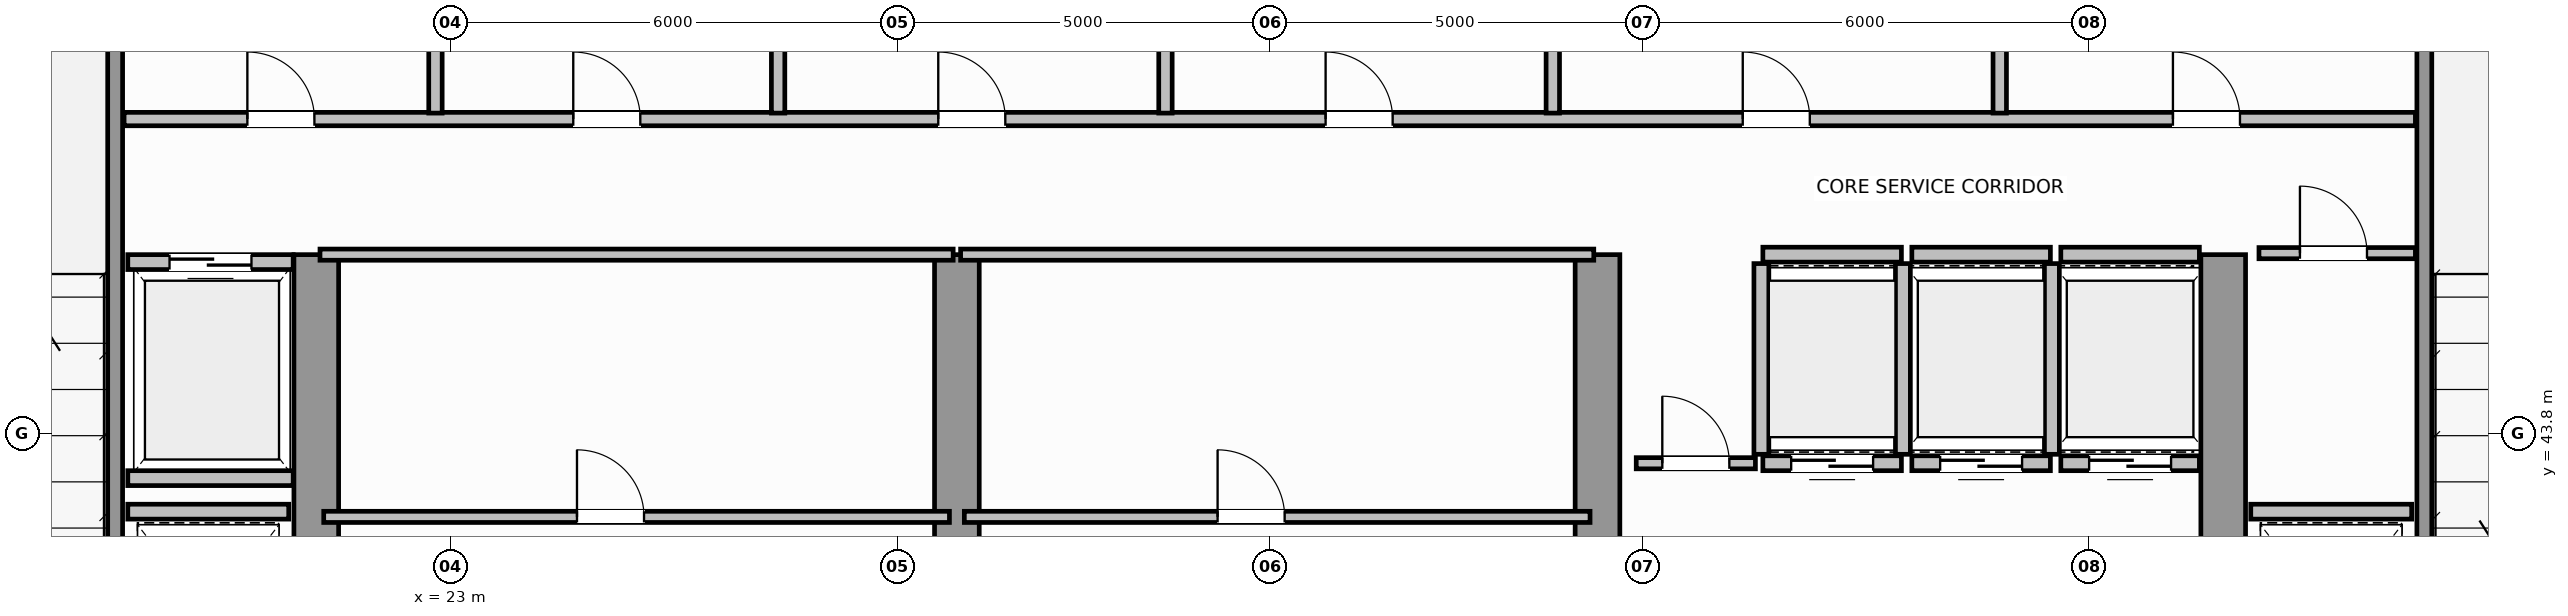
"""IFC4 building model, lengths in metres.
Left out: names, types, materials, properties, quantities, classifications, styles, units other than length and angle.
Written with IfcOpenShell. Run it as: python <this file> out.ifc"""

import sys

from ifc_helpers import new_model, si_unit, direction, frame, frame_2d, origin, place, context, subcontext, project, spatial, rectangle, extrude, source, transform, mapped, element, fill, save


model = new_model("IFC4")
c1 = context("Model", 3, precision=1e-05, world=origin(), true_north=direction((0.0, 1.0)))
c2 = subcontext(c1, "Body", "Model", "MODEL_VIEW")
j1 = project(units=[si_unit("LENGTHUNIT", "METRE"), si_unit("PLANEANGLEUNIT", "RADIAN")], contexts=[c1])
p1 = place(None, origin())
s1 = spatial("IfcSite", under=j1, at=p1, CompositionType="ELEMENT")
p2 = place(p1, origin())
s2 = spatial("IfcBuilding", under=s1, at=p2, CompositionType="ELEMENT")
p3 = place(p2, frame((0.0, 0.0, 218.4)))
s3 = spatial("IfcBuildingStorey", under=s2, at=p3, CompositionType="ELEMENT", Elevation=218.4)
p4 = place(p3, frame((21.2, 36.82, 0.0), z_axis=(0.0, 0.0, 1.0), x_axis=(0.0, 1.0, 0.0)))
e1 = element("IfcWall", 1, at=p4, inside=s3, PredefinedType="SHEAR", context=c2, shape_type="SweptSolid", body=[
    extrude(rectangle(XDim=9.38, YDim=0.6, at=frame_2d((4.69, 0.0))), origin(), (0.0, 0.0, 1.0), 4.8),
])
p5 = place(p3, frame((29.8, 36.82, 0.0), z_axis=(0.0, 0.0, 1.0), x_axis=(0.0, 1.0, 0.0)))
e2 = element("IfcWall", 2, at=p5, inside=s3, PredefinedType="SHEAR", context=c2, shape_type="SweptSolid", body=[
    extrude(rectangle(XDim=9.38, YDim=0.6, at=frame_2d((4.69, 0.0))), origin(), (0.0, 0.0, 1.0), 4.8),
])
p6 = place(p5, frame((4.05, 0.0, 0.0)))
e3 = element("IfcOpeningElement", 3, at=p6, cuts=e2, PredefinedType="OPENING", context=c2, shape_type="SweptSolid", body=[
    extrude(rectangle(XDim=1.1, YDim=2.15, at=frame_2d((0.55, 1.075))), frame((0.0, 0.31, 0.0), z_axis=(0.0, -1.0, 0.0), x_axis=(1.0, 0.0, 0.0)), (0.0, 0.0, 1.0), 0.62),
])
p7 = place(p3, frame((38.4, 36.82, 0.0), z_axis=(0.0, 0.0, 1.0), x_axis=(0.0, 1.0, 0.0)))
e4 = element("IfcWall", 4, at=p7, inside=s3, PredefinedType="SHEAR", context=c2, shape_type="SweptSolid", body=[
    extrude(rectangle(XDim=9.38, YDim=0.6, at=frame_2d((4.69, 0.0))), origin(), (0.0, 0.0, 1.0), 4.8),
])
p8 = place(p7, frame((4.05, 0.0, 0.0)))
e5 = element("IfcOpeningElement", 5, at=p8, cuts=e4, PredefinedType="OPENING", context=c2, shape_type="SweptSolid", body=[
    extrude(rectangle(XDim=1.1, YDim=2.15, at=frame_2d((0.55, 1.075))), frame((0.0, 0.31, 0.0), z_axis=(0.0, -1.0, 0.0), x_axis=(1.0, 0.0, 0.0)), (0.0, 0.0, 1.0), 0.62),
])
p9 = place(p3, frame((46.8, 36.82, 0.0), z_axis=(0.0, 0.0, 1.0), x_axis=(0.0, 1.0, 0.0)))
e6 = element("IfcWall", 6, at=p9, inside=s3, PredefinedType="SHEAR", context=c2, shape_type="SweptSolid", body=[
    extrude(rectangle(XDim=9.38, YDim=0.6, at=frame_2d((4.69, 0.0))), origin(), (0.0, 0.0, 1.0), 4.8),
])
for number, where, z_axis, x_axis in (
    (7, (18.5, 39.96, 0.0), (0.0, 0.0, 1.0), (0.0, 1.0, 0.0)),
    (8, (49.5, 39.96, 0.0), (0.0, 0.0, 1.0), (0.0, 1.0, 0.0)),
):
    element("IfcWall", number, at=place(p3, frame(where, z_axis=z_axis, x_axis=x_axis)), inside=s3, PredefinedType="SOLIDWALL", context=c2, shape_type="SweptSolid", body=[
        extrude(rectangle(XDim=9.93, YDim=0.2, at=frame_2d((4.965, 0.0))), origin(), (0.0, 0.0, 1.0), 4.8),
    ])
p10 = place(p3, frame((40.62, 43.4, 0.0), z_axis=(0.0, 0.0, 1.0), x_axis=(1.0, 0.0, 0.0)))
e9 = element("IfcWall", 9, at=p10, inside=s3, PredefinedType="SOLIDWALL", context=c2, shape_type="SweptSolid", body=[
    extrude(rectangle(XDim=1.86, YDim=0.2, at=frame_2d((0.93, 0.0))), origin(), (0.0, 0.0, 1.0), 4.54),
])
p11 = place(p10, frame((0.38, 0.0, 0.0)))
e10 = element("IfcOpeningElement", 10, at=p11, cuts=e9, PredefinedType="OPENING", context=c2, shape_type="SweptSolid", body=[
    extrude(rectangle(XDim=1.1, YDim=2.15, at=frame_2d((0.55, 1.075))), frame((0.0, 0.11, 0.0), z_axis=(0.0, -1.0, 0.0), x_axis=(1.0, 0.0, 0.0)), (0.0, 0.0, 1.0), 0.22),
])
p12 = place(p3, frame((40.62, 46.2, 0.0), z_axis=(0.0, 0.0, 1.0), x_axis=(1.0, 0.0, 0.0)))
e11 = element("IfcWall", 11, at=p12, inside=s3, PredefinedType="SOLIDWALL", context=c2, shape_type="SweptSolid", body=[
    extrude(rectangle(XDim=1.86, YDim=0.2, at=frame_2d((0.93, 0.0))), origin(), (0.0, 0.0, 1.0), 4.54),
])
for number, where, z_axis, x_axis in (
    (12, (40.6, 43.52, 0.0), (0.0, 0.0, 1.0), (0.0, 1.0, 0.0)),
    (13, (42.5, 43.52, 0.0), (0.0, 0.0, 1.0), (0.0, 1.0, 0.0)),
):
    element("IfcWall", number, at=place(p3, frame(where, z_axis=z_axis, x_axis=x_axis)), inside=s3, PredefinedType="SOLIDWALL", context=c2, shape_type="SweptSolid", body=[
        extrude(rectangle(XDim=2.56, YDim=0.2, at=frame_2d((1.28, 0.0))), origin(), (0.0, 0.0, 1.0), 4.54),
    ])
p13 = place(p3, frame((42.62, 43.4, 0.0), z_axis=(0.0, 0.0, 1.0), x_axis=(1.0, 0.0, 0.0)))
e14 = element("IfcWall", 14, at=p13, inside=s3, PredefinedType="SOLIDWALL", context=c2, shape_type="SweptSolid", body=[
    extrude(rectangle(XDim=1.86, YDim=0.2, at=frame_2d((0.93, 0.0))), origin(), (0.0, 0.0, 1.0), 4.54),
])
p14 = place(p13, frame((0.38, 0.0, 0.0)))
e15 = element("IfcOpeningElement", 15, at=p14, cuts=e14, PredefinedType="OPENING", context=c2, shape_type="SweptSolid", body=[
    extrude(rectangle(XDim=1.1, YDim=2.15, at=frame_2d((0.55, 1.075))), frame((0.0, 0.11, 0.0), z_axis=(0.0, -1.0, 0.0), x_axis=(1.0, 0.0, 0.0)), (0.0, 0.0, 1.0), 0.22),
])
p15 = place(p3, frame((42.62, 46.2, 0.0), z_axis=(0.0, 0.0, 1.0), x_axis=(1.0, 0.0, 0.0)))
e16 = element("IfcWall", 16, at=p15, inside=s3, PredefinedType="SOLIDWALL", context=c2, shape_type="SweptSolid", body=[
    extrude(rectangle(XDim=1.86, YDim=0.2, at=frame_2d((0.93, 0.0))), origin(), (0.0, 0.0, 1.0), 4.54),
])
p16 = place(p3, frame((44.5, 43.52, 0.0), z_axis=(0.0, 0.0, 1.0), x_axis=(0.0, 1.0, 0.0)))
e17 = element("IfcWall", 17, at=p16, inside=s3, PredefinedType="SOLIDWALL", context=c2, shape_type="SweptSolid", body=[
    extrude(rectangle(XDim=2.56, YDim=0.2, at=frame_2d((1.28, 0.0))), origin(), (0.0, 0.0, 1.0), 4.54),
])
p17 = place(p3, frame((44.62, 43.4, 0.0), z_axis=(0.0, 0.0, 1.0), x_axis=(1.0, 0.0, 0.0)))
e18 = element("IfcWall", 18, at=p17, inside=s3, PredefinedType="SOLIDWALL", context=c2, shape_type="SweptSolid", body=[
    extrude(rectangle(XDim=1.86, YDim=0.2, at=frame_2d((0.93, 0.0))), origin(), (0.0, 0.0, 1.0), 4.54),
])
p18 = place(p17, frame((0.38, 0.0, 0.0)))
e19 = element("IfcOpeningElement", 19, at=p18, cuts=e18, PredefinedType="OPENING", context=c2, shape_type="SweptSolid", body=[
    extrude(rectangle(XDim=1.1, YDim=2.15, at=frame_2d((0.55, 1.075))), frame((0.0, 0.11, 0.0), z_axis=(0.0, -1.0, 0.0), x_axis=(1.0, 0.0, 0.0)), (0.0, 0.0, 1.0), 0.22),
])
p19 = place(p3, frame((44.62, 46.2, 0.0), z_axis=(0.0, 0.0, 1.0), x_axis=(1.0, 0.0, 0.0)))
e20 = element("IfcWall", 20, at=p19, inside=s3, PredefinedType="SOLIDWALL", context=c2, shape_type="SweptSolid", body=[
    extrude(rectangle(XDim=1.86, YDim=0.2, at=frame_2d((0.93, 0.0))), origin(), (0.0, 0.0, 1.0), 4.54),
])
p20 = place(p3, frame((18.67, 46.1, 0.0), z_axis=(0.0, 0.0, 1.0), x_axis=(1.0, 0.0, 0.0)))
e21 = element("IfcWall", 21, at=p20, inside=s3, PredefinedType="SOLIDWALL", context=c2, shape_type="SweptSolid", body=[
    extrude(rectangle(XDim=2.22, YDim=0.2, at=frame_2d((1.11, 0.0))), origin(), (0.0, 0.0, 1.0), 4.54),
])
p21 = place(p20, frame((0.56, 0.0, 0.0)))
e22 = element("IfcOpeningElement", 22, at=p21, cuts=e21, PredefinedType="OPENING", context=c2, shape_type="SweptSolid", body=[
    extrude(rectangle(XDim=1.1, YDim=2.15, at=frame_2d((0.55, 1.075))), frame((0.0, 0.11, 0.0), z_axis=(0.0, -1.0, 0.0), x_axis=(1.0, 0.0, 0.0)), (0.0, 0.0, 1.0), 0.22),
])
p22 = place(p3, frame((18.67, 43.2, 0.0), z_axis=(0.0, 0.0, 1.0), x_axis=(1.0, 0.0, 0.0)))
e23 = element("IfcWall", 23, at=p22, inside=s3, PredefinedType="SOLIDWALL", context=c2, shape_type="SweptSolid", body=[
    extrude(rectangle(XDim=2.22, YDim=0.2, at=frame_2d((1.11, 0.0))), origin(), (0.0, 0.0, 1.0), 4.54),
])
for number, where, z_axis, x_axis in (
    (24, (18.67, 42.75, 0.0), (0.0, 0.0, 1.0), (1.0, 0.0, 0.0)),
    (25, (47.17, 42.75, 0.0), (0.0, 0.0, 1.0), (1.0, 0.0, 0.0)),
):
    element("IfcWall", number, at=place(p3, frame(where, z_axis=z_axis, x_axis=x_axis)), inside=s3, PredefinedType="SOLIDWALL", context=c2, shape_type="SweptSolid", body=[
        extrude(rectangle(XDim=2.16, YDim=0.2, at=frame_2d((1.08, 0.0))), origin(), (0.0, 0.0, 1.0), 4.54),
    ])
p23 = place(p3, frame((21.25, 46.2, 0.0), z_axis=(0.0, 0.0, 1.0), x_axis=(1.0, 0.0, 0.0)))
e26 = element("IfcWall", 26, at=p23, inside=s3, PredefinedType="PARTITIONING", context=c2, shape_type="SweptSolid", body=[
    extrude(rectangle(XDim=8.5, YDim=0.15, at=frame_2d((4.25, 0.0))), origin(), (0.0, 0.0, 1.0), 4.54),
])
p24 = place(p3, frame((21.3, 42.68, 0.0), z_axis=(0.0, 0.0, 1.0), x_axis=(1.0, 0.0, 0.0)))
e27 = element("IfcWall", 27, at=p24, inside=s3, PredefinedType="PARTITIONING", context=c2, shape_type="SweptSolid", body=[
    extrude(rectangle(XDim=8.4, YDim=0.15, at=frame_2d((4.2, 0.0))), origin(), (0.0, 0.0, 1.0), 4.54),
])
p25 = place(p24, frame((3.4, 0.0, 0.0)))
e28 = element("IfcOpeningElement", 28, at=p25, cuts=e27, PredefinedType="OPENING", context=c2, shape_type="SweptSolid", body=[
    extrude(rectangle(XDim=0.9, YDim=2.1, at=frame_2d((0.45, 1.05))), frame((0.0, 0.085, 0.0), z_axis=(0.0, -1.0, 0.0), x_axis=(1.0, 0.0, 0.0)), (0.0, 0.0, 1.0), 0.17),
])
p26 = place(p3, frame((29.85, 46.2, 0.0), z_axis=(0.0, 0.0, 1.0), x_axis=(1.0, 0.0, 0.0)))
e29 = element("IfcWall", 29, at=p26, inside=s3, PredefinedType="PARTITIONING", context=c2, shape_type="SweptSolid", body=[
    extrude(rectangle(XDim=8.5, YDim=0.15, at=frame_2d((4.25, 0.0))), origin(), (0.0, 0.0, 1.0), 4.54),
])
p27 = place(p3, frame((29.9, 42.68, 0.0), z_axis=(0.0, 0.0, 1.0), x_axis=(1.0, 0.0, 0.0)))
e30 = element("IfcWall", 30, at=p27, inside=s3, PredefinedType="PARTITIONING", context=c2, shape_type="SweptSolid", body=[
    extrude(rectangle(XDim=8.4, YDim=0.15, at=frame_2d((4.2, 0.0))), origin(), (0.0, 0.0, 1.0), 4.54),
])
p28 = place(p27, frame((3.4, 0.0, 0.0)))
e31 = element("IfcOpeningElement", 31, at=p28, cuts=e30, PredefinedType="OPENING", context=c2, shape_type="SweptSolid", body=[
    extrude(rectangle(XDim=0.9, YDim=2.1, at=frame_2d((0.45, 1.05))), frame((0.0, 0.085, 0.0), z_axis=(0.0, -1.0, 0.0), x_axis=(1.0, 0.0, 0.0)), (0.0, 0.0, 1.0), 0.17),
])
p29 = place(p3, frame((47.28, 46.22, 0.0), z_axis=(0.0, 0.0, 1.0), x_axis=(1.0, 0.0, 0.0)))
e32 = element("IfcWall", 32, at=p29, inside=s3, PredefinedType="PARTITIONING", context=c2, shape_type="SweptSolid", body=[
    extrude(rectangle(XDim=2.1, YDim=0.15, at=frame_2d((1.05, 0.0))), origin(), (0.0, 0.0, 1.0), 4.54),
])
p30 = place(p29, frame((0.55, 0.0, 0.0)))
e33 = element("IfcOpeningElement", 33, at=p30, cuts=e32, PredefinedType="OPENING", context=c2, shape_type="SweptSolid", body=[
    extrude(rectangle(XDim=0.9, YDim=2.1, at=frame_2d((0.45, 1.05))), frame((0.0, 0.085, 0.0), z_axis=(0.0, -1.0, 0.0), x_axis=(1.0, 0.0, 0.0)), (0.0, 0.0, 1.0), 0.17),
])
p31 = place(p3, frame((38.92, 43.4, 0.0), z_axis=(0.0, 0.0, 1.0), x_axis=(1.0, 0.0, 0.0)))
e34 = element("IfcWall", 34, at=p31, inside=s3, PredefinedType="PARTITIONING", context=c2, shape_type="SweptSolid", body=[
    extrude(rectangle(XDim=1.6, YDim=0.15, at=frame_2d((0.8, 0.0))), origin(), (0.0, 0.0, 1.0), 4.54),
])
p32 = place(p31, frame((0.35, 0.0, 0.0)))
e35 = element("IfcOpeningElement", 35, at=p32, cuts=e34, PredefinedType="OPENING", context=c2, shape_type="SweptSolid", body=[
    extrude(rectangle(XDim=0.9, YDim=2.1, at=frame_2d((0.45, 1.05))), frame((0.0, 0.085, 0.0), z_axis=(0.0, -1.0, 0.0), x_axis=(1.0, 0.0, 0.0)), (0.0, 0.0, 1.0), 0.17),
])
p33 = place(p3, frame((18.62, 48.02, 0.0), z_axis=(0.0, 0.0, 1.0), x_axis=(1.0, 0.0, 0.0)))
e36 = element("IfcWall", 36, at=p33, inside=s3, PredefinedType="PLUMBINGWALL", context=c2, shape_type="SweptSolid", body=[
    extrude(rectangle(XDim=30.76, YDim=0.18, at=frame_2d((15.38, 0.0))), origin(), (0.0, 0.0, 1.0), 4.54),
])
p34 = place(p33, frame((1.655, 0.0, 0.0)))
e37 = element("IfcOpeningElement", 37, at=p34, cuts=e36, PredefinedType="OPENING", context=c2, shape_type="SweptSolid", body=[
    extrude(rectangle(XDim=0.9, YDim=2.15, at=frame_2d((0.45, 1.075))), frame((0.0, 0.1, 0.0), z_axis=(0.0, -1.0, 0.0), x_axis=(1.0, 0.0, 0.0)), (0.0, 0.0, 1.0), 0.2),
])
p35 = place(p33, frame((6.03, 0.0, 0.0)))
e38 = element("IfcOpeningElement", 38, at=p35, cuts=e36, PredefinedType="OPENING", context=c2, shape_type="SweptSolid", body=[
    extrude(rectangle(XDim=0.9, YDim=2.15, at=frame_2d((0.45, 1.075))), frame((0.0, 0.1, 0.0), z_axis=(0.0, -1.0, 0.0), x_axis=(1.0, 0.0, 0.0)), (0.0, 0.0, 1.0), 0.2),
])
p36 = place(p33, frame((10.93, 0.0, 0.0)))
e39 = element("IfcOpeningElement", 39, at=p36, cuts=e36, PredefinedType="OPENING", context=c2, shape_type="SweptSolid", body=[
    extrude(rectangle(XDim=0.9, YDim=2.15, at=frame_2d((0.45, 1.075))), frame((0.0, 0.1, 0.0), z_axis=(0.0, -1.0, 0.0), x_axis=(1.0, 0.0, 0.0)), (0.0, 0.0, 1.0), 0.2),
])
p37 = place(p33, frame((16.13, 0.0, 0.0)))
e40 = element("IfcOpeningElement", 40, at=p37, cuts=e36, PredefinedType="OPENING", context=c2, shape_type="SweptSolid", body=[
    extrude(rectangle(XDim=0.9, YDim=2.15, at=frame_2d((0.45, 1.075))), frame((0.0, 0.1, 0.0), z_axis=(0.0, -1.0, 0.0), x_axis=(1.0, 0.0, 0.0)), (0.0, 0.0, 1.0), 0.2),
])
p38 = place(p33, frame((21.73, 0.0, 0.0)))
e41 = element("IfcOpeningElement", 41, at=p38, cuts=e36, PredefinedType="OPENING", context=c2, shape_type="SweptSolid", body=[
    extrude(rectangle(XDim=0.9, YDim=2.15, at=frame_2d((0.45, 1.075))), frame((0.0, 0.1, 0.0), z_axis=(0.0, -1.0, 0.0), x_axis=(1.0, 0.0, 0.0)), (0.0, 0.0, 1.0), 0.2),
])
p39 = place(p33, frame((27.505, 0.0, 0.0)))
e42 = element("IfcOpeningElement", 42, at=p39, cuts=e36, PredefinedType="OPENING", context=c2, shape_type="SweptSolid", body=[
    extrude(rectangle(XDim=0.9, YDim=2.15, at=frame_2d((0.45, 1.075))), frame((0.0, 0.1, 0.0), z_axis=(0.0, -1.0, 0.0), x_axis=(1.0, 0.0, 0.0)), (0.0, 0.0, 1.0), 0.2),
])
p40 = place(p3, frame((22.8, 48.1, 0.0), z_axis=(0.0, 0.0, 1.0), x_axis=(0.0, 1.0, 0.0)))
e43 = element("IfcWall", 43, at=p40, inside=s3, PredefinedType="PLUMBINGWALL", context=c2, shape_type="SweptSolid", body=[
    extrude(rectangle(XDim=2.28, YDim=0.18, at=frame_2d((1.14, 0.0))), origin(), (0.0, 0.0, 1.0), 3.93),
])
for number, where, z_axis, x_axis in (
    (44, (27.4, 48.1, 0.0), (0.0, 0.0, 1.0), (0.0, 1.0, 0.0)),
    (45, (32.6, 48.1, 0.0), (0.0, 0.0, 1.0), (0.0, 1.0, 0.0)),
    (46, (37.8, 48.1, 0.0), (0.0, 0.0, 1.0), (0.0, 1.0, 0.0)),
    (47, (43.8, 48.1, 0.0), (0.0, 0.0, 1.0), (0.0, 1.0, 0.0)),
):
    element("IfcWall", number, at=place(p3, frame(where, z_axis=z_axis, x_axis=x_axis)), inside=s3, PredefinedType="PLUMBINGWALL", context=c2, shape_type="SweptSolid", body=[
        extrude(rectangle(XDim=2.28, YDim=0.18, at=frame_2d((1.14, 0.0))), origin(), (0.0, 0.0, 1.0), 4.54),
    ])
m1 = source(origin(), c2, "Body", "SweptSolid", [
    extrude(rectangle(XDim=1.1, YDim=2.15, at=frame_2d((0.55, 1.075))), frame((0.0, 0.025, 0.0), z_axis=(0.0, -1.0, 0.0), x_axis=(1.0, 0.0, 0.0)), (0.0, 0.0, 1.0), 0.05),
])
p41 = place(p11, origin())
e48 = element("IfcDoor", 48, at=p41, inside=s3, OperationType="DOUBLE_DOOR_SLIDING", PredefinedType="DOOR", context=c2, shape_type="MappedRepresentation", body=[
    mapped(m1, transform((0.0, 0.0, 0.0), scale=1.0)),
])
fill(e10, e48)
p42 = place(p14, origin())
e49 = element("IfcDoor", 49, at=p42, inside=s3, OperationType="DOUBLE_DOOR_SLIDING", PredefinedType="DOOR", context=c2, shape_type="MappedRepresentation", body=[
    mapped(m1, transform((0.0, 0.0, 0.0), scale=1.0)),
])
fill(e15, e49)
p43 = place(p18, origin())
e50 = element("IfcDoor", 50, at=p43, inside=s3, OperationType="DOUBLE_DOOR_SLIDING", PredefinedType="DOOR", context=c2, shape_type="MappedRepresentation", body=[
    mapped(m1, transform((0.0, 0.0, 0.0), scale=1.0)),
])
fill(e19, e50)
p44 = place(p21, origin())
e51 = element("IfcDoor", 51, at=p44, inside=s3, OperationType="DOUBLE_DOOR_SLIDING", PredefinedType="DOOR", context=c2, shape_type="MappedRepresentation", body=[
    mapped(m1, transform((0.0, 0.0, 0.0), scale=1.0)),
])
fill(e22, e51)
m2 = source(origin(), c2, "Body", "SweptSolid", [
    extrude(rectangle(XDim=0.9, YDim=2.1, at=frame_2d((0.45, 1.05))), frame((0.0, 0.025, 0.0), z_axis=(0.0, -1.0, 0.0), x_axis=(1.0, 0.0, 0.0)), (0.0, 0.0, 1.0), 0.05),
])
p45 = place(p25, origin())
e52 = element("IfcDoor", 52, at=p45, inside=s3, OperationType="SINGLE_SWING_RIGHT", PredefinedType="DOOR", context=c2, shape_type="MappedRepresentation", body=[
    mapped(m2, transform((0.0, 0.0, 0.0), scale=1.0)),
])
fill(e28, e52)
p46 = place(p28, origin())
e53 = element("IfcDoor", 53, at=p46, inside=s3, OperationType="SINGLE_SWING_RIGHT", PredefinedType="DOOR", context=c2, shape_type="MappedRepresentation", body=[
    mapped(m2, transform((0.0, 0.0, 0.0), scale=1.0)),
])
fill(e31, e53)
p47 = place(p30, origin())
e54 = element("IfcDoor", 54, at=p47, inside=s3, OperationType="SINGLE_SWING_RIGHT", PredefinedType="DOOR", context=c2, shape_type="MappedRepresentation", body=[
    mapped(m2, transform((0.0, 0.0, 0.0), scale=1.0)),
])
fill(e33, e54)
p48 = place(p32, origin())
e55 = element("IfcDoor", 55, at=p48, inside=s3, OperationType="SINGLE_SWING_LEFT", PredefinedType="DOOR", context=c2, shape_type="MappedRepresentation", body=[
    mapped(m2, transform((0.0, 0.0, 0.0), scale=1.0)),
])
fill(e35, e55)
m3 = source(origin(), c2, "Body", "SweptSolid", [
    extrude(rectangle(XDim=0.9, YDim=2.15, at=frame_2d((0.45, 1.075))), frame((0.0, 0.025, 0.0), z_axis=(0.0, -1.0, 0.0), x_axis=(1.0, 0.0, 0.0)), (0.0, 0.0, 1.0), 0.05),
])
p49 = place(p34, origin())
e56 = element("IfcDoor", 56, at=p49, inside=s3, OperationType="SINGLE_SWING_LEFT", PredefinedType="DOOR", context=c2, shape_type="MappedRepresentation", body=[
    mapped(m3, transform((0.0, 0.0, 0.0), scale=1.0)),
])
fill(e37, e56)
p50 = place(p35, origin())
e57 = element("IfcDoor", 57, at=p50, inside=s3, OperationType="SINGLE_SWING_RIGHT", PredefinedType="DOOR", context=c2, shape_type="MappedRepresentation", body=[
    mapped(m3, transform((0.0, 0.0, 0.0), scale=1.0)),
])
fill(e38, e57)
p51 = place(p36, origin())
e58 = element("IfcDoor", 58, at=p51, inside=s3, OperationType="SINGLE_SWING_LEFT", PredefinedType="DOOR", context=c2, shape_type="MappedRepresentation", body=[
    mapped(m3, transform((0.0, 0.0, 0.0), scale=1.0)),
])
fill(e39, e58)
p52 = place(p37, origin())
e59 = element("IfcDoor", 59, at=p52, inside=s3, OperationType="SINGLE_SWING_RIGHT", PredefinedType="DOOR", context=c2, shape_type="MappedRepresentation", body=[
    mapped(m3, transform((0.0, 0.0, 0.0), scale=1.0)),
])
fill(e40, e59)
p53 = place(p38, origin())
e60 = element("IfcDoor", 60, at=p53, inside=s3, OperationType="SINGLE_SWING_LEFT", PredefinedType="DOOR", context=c2, shape_type="MappedRepresentation", body=[
    mapped(m3, transform((0.0, 0.0, 0.0), scale=1.0)),
])
fill(e41, e60)
p54 = place(p39, origin())
e61 = element("IfcDoor", 61, at=p54, inside=s3, OperationType="SINGLE_SWING_RIGHT", PredefinedType="DOOR", context=c2, shape_type="MappedRepresentation", body=[
    mapped(m3, transform((0.0, 0.0, 0.0), scale=1.0)),
])
fill(e42, e61)
save(model, sys.argv[1])
